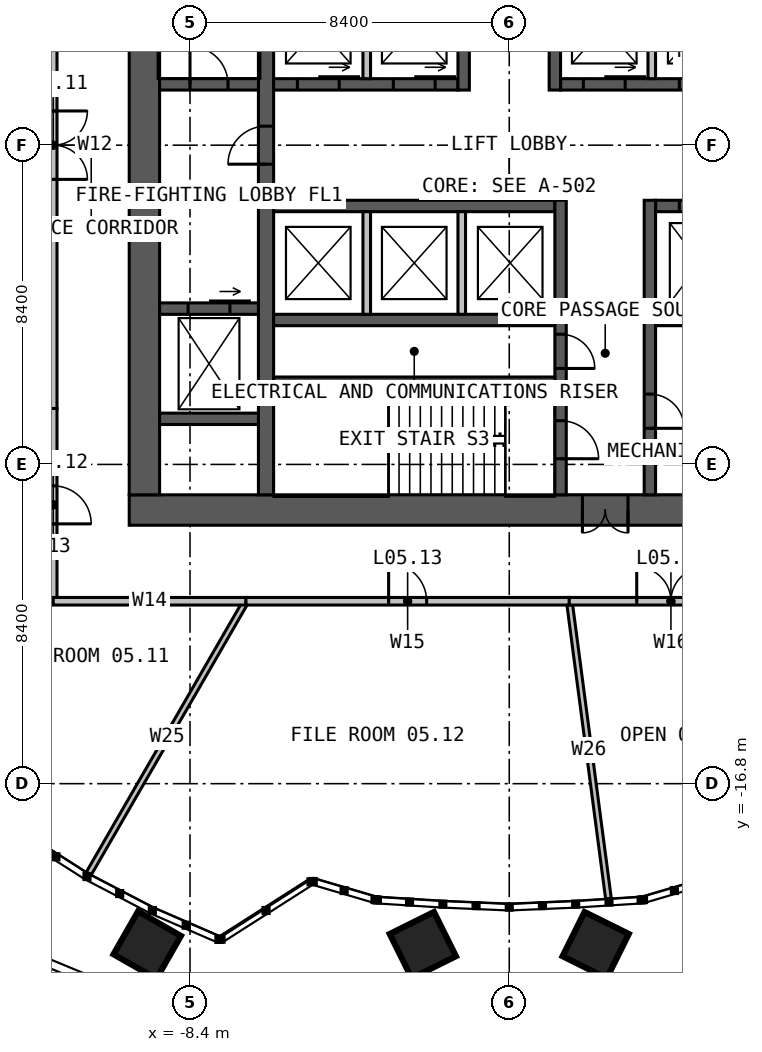
"""IFC4 building model, lengths in metres.
Left out: names, types, materials, properties, quantities, classifications, styles, units other than length and angle.
Written with IfcOpenShell. Run it as: python <this file> out.ifc"""

import sys

from ifc_helpers import new_model, si_unit, direction, frame, frame_2d, origin, place, context, subcontext, project, spatial, rectangle, extrude, element, fill, save


model = new_model("IFC4")
c1 = context("Model", 3, precision=1e-05, world=origin(), true_north=direction((0.0, 1.0)))
c2 = subcontext(c1, "Body", "Model", "MODEL_VIEW")
j1 = project(units=[si_unit("LENGTHUNIT", "METRE"), si_unit("PLANEANGLEUNIT", "RADIAN")], contexts=[c1])
p1 = place(None, origin())
s1 = spatial("IfcSite", under=j1, at=p1, CompositionType="ELEMENT")
p2 = place(p1, origin())
s2 = spatial("IfcBuilding", under=s1, at=p2, CompositionType="ELEMENT")
p3 = place(p2, frame((0.0, 0.0, 25.0)))
s3 = spatial("IfcBuildingStorey", under=s2, at=p3, CompositionType="ELEMENT", Elevation=25.0)
p4 = place(p3, frame((10.0, -9.6, 0.0), z_axis=(0.0, 0.0, 1.0), x_axis=(-1.0, 0.0, 0.0)))
e1 = element("IfcWall", 1, at=p4, inside=s3, PredefinedType="SOLIDWALL", context=c2, shape_type="SweptSolid", body=[
    extrude(rectangle(XDim=20.0, YDim=0.8, at=frame_2d((10.0, 0.0))), origin(), (0.0, 0.0, 1.0), 4.0),
])
p5 = place(p4, frame((6.875, 0.0, 0.0)))
e2 = element("IfcOpeningElement", 2, at=p5, cuts=e1, PredefinedType="OPENING", context=c2, shape_type="SweptSolid", body=[
    extrude(rectangle(XDim=1.2, YDim=2.2, at=frame_2d((0.6, 1.1))), frame((0.0, 0.41, 0.0), z_axis=(0.0, -1.0, 0.0), x_axis=(1.0, 0.0, 0.0)), (0.0, 0.0, 1.0), 0.82),
])
p6 = place(p3, frame((-9.6, 9.2, 0.0), z_axis=(0.0, 0.0, 1.0), x_axis=(0.0, -1.0, 0.0)))
e3 = element("IfcWall", 3, at=p6, inside=s3, PredefinedType="SOLIDWALL", context=c2, shape_type="SweptSolid", body=[
    extrude(rectangle(XDim=18.4, YDim=0.8, at=frame_2d((9.2, 0.0))), origin(), (0.0, 0.0, 1.0), 4.0),
])
p7 = place(p3, frame((-6.4, -9.2, 0.0), z_axis=(0.0, 0.0, 1.0), x_axis=(0.0, 1.0, 0.0)))
e4 = element("IfcWall", 4, at=p7, inside=s3, PredefinedType="SOLIDWALL", context=c2, shape_type="SweptSolid", body=[
    extrude(rectangle(XDim=18.4, YDim=0.4, at=frame_2d((9.2, 0.0))), origin(), (0.0, 0.0, 1.0), 4.0),
])
p8 = place(p7, frame((8.7, 0.0, 0.0)))
e5 = element("IfcOpeningElement", 5, at=p8, cuts=e4, PredefinedType="OPENING", context=c2, shape_type="SweptSolid", body=[
    extrude(rectangle(XDim=1.0, YDim=2.2, at=frame_2d((0.5, 1.1))), frame((0.0, 0.21, 0.0), z_axis=(0.0, -1.0, 0.0), x_axis=(1.0, 0.0, 0.0)), (0.0, 0.0, 1.0), 0.42),
])
p9 = place(p3, frame((-6.2, 1.6, 0.0), z_axis=(0.0, 0.0, 1.0), x_axis=(1.0, 0.0, 0.0)))
e6 = element("IfcWall", 6, at=p9, inside=s3, PredefinedType="SOLIDWALL", context=c2, shape_type="SweptSolid", body=[
    extrude(rectangle(XDim=4.85, YDim=0.3, at=frame_2d((2.425, 0.0))), origin(), (0.0, 0.0, 1.0), 4.0),
])
p10 = place(p9, frame((0.625, 0.0, 0.0)))
e7 = element("IfcOpeningElement", 7, at=p10, cuts=e6, PredefinedType="OPENING", context=c2, shape_type="SweptSolid", body=[
    extrude(rectangle(XDim=1.1, YDim=2.2, at=frame_2d((0.55, 1.1))), frame((0.0, 0.16, 0.0), z_axis=(0.0, -1.0, 0.0), x_axis=(1.0, 0.0, 0.0)), (0.0, 0.0, 1.0), 0.32),
])
p11 = place(p9, frame((3.15, 0.0, 0.0)))
e8 = element("IfcOpeningElement", 8, at=p11, cuts=e6, PredefinedType="OPENING", context=c2, shape_type="SweptSolid", body=[
    extrude(rectangle(XDim=1.1, YDim=2.2, at=frame_2d((0.55, 1.1))), frame((0.0, 0.16, 0.0), z_axis=(0.0, -1.0, 0.0), x_axis=(1.0, 0.0, 0.0)), (0.0, 0.0, 1.0), 0.32),
])
p12 = place(p3, frame((1.35, 1.6, 0.0), z_axis=(0.0, 0.0, 1.0), x_axis=(1.0, 0.0, 0.0)))
e9 = element("IfcWall", 9, at=p12, inside=s3, PredefinedType="SOLIDWALL", context=c2, shape_type="SweptSolid", body=[
    extrude(rectangle(XDim=4.85, YDim=0.3, at=frame_2d((2.425, 0.0))), origin(), (0.0, 0.0, 1.0), 4.0),
])
p13 = place(p12, frame((0.6, 0.0, 0.0)))
e10 = element("IfcOpeningElement", 10, at=p13, cuts=e9, PredefinedType="OPENING", context=c2, shape_type="SweptSolid", body=[
    extrude(rectangle(XDim=1.1, YDim=2.2, at=frame_2d((0.55, 1.1))), frame((0.0, 0.16, 0.0), z_axis=(0.0, -1.0, 0.0), x_axis=(1.0, 0.0, 0.0)), (0.0, 0.0, 1.0), 0.32),
])
p14 = place(p12, frame((3.125, 0.0, 0.0)))
e11 = element("IfcOpeningElement", 11, at=p14, cuts=e9, PredefinedType="OPENING", context=c2, shape_type="SweptSolid", body=[
    extrude(rectangle(XDim=1.1, YDim=2.2, at=frame_2d((0.55, 1.1))), frame((0.0, 0.16, 0.0), z_axis=(0.0, -1.0, 0.0), x_axis=(1.0, 0.0, 0.0)), (0.0, 0.0, 1.0), 0.32),
])
p15 = place(p3, frame((-1.2, 1.45, 0.0), z_axis=(0.0, 0.0, 1.0), x_axis=(0.0, 1.0, 0.0)))
e12 = element("IfcWall", 12, at=p15, inside=s3, PredefinedType="SOLIDWALL", context=c2, shape_type="SweptSolid", body=[
    extrude(rectangle(XDim=7.75, YDim=0.3, at=frame_2d((3.875, 0.0))), origin(), (0.0, 0.0, 1.0), 4.0),
])
p16 = place(p15, frame((5.05, 0.0, 0.0)))
e13 = element("IfcOpeningElement", 13, at=p16, cuts=e12, PredefinedType="OPENING", context=c2, shape_type="SweptSolid", body=[
    extrude(rectangle(XDim=1.0, YDim=2.2, at=frame_2d((0.5, 1.1))), frame((0.0, 0.16, 0.0), z_axis=(0.0, -1.0, 0.0), x_axis=(1.0, 0.0, 0.0)), (0.0, 0.0, 1.0), 0.32),
])
p17 = place(p3, frame((1.2, 1.45, 0.0), z_axis=(0.0, 0.0, 1.0), x_axis=(0.0, 1.0, 0.0)))
e14 = element("IfcWall", 14, at=p17, inside=s3, PredefinedType="SOLIDWALL", context=c2, shape_type="SweptSolid", body=[
    extrude(rectangle(XDim=7.75, YDim=0.3, at=frame_2d((3.875, 0.0))), origin(), (0.0, 0.0, 1.0), 4.0),
])
p18 = place(p17, frame((3.8, 0.0, 0.0)))
e15 = element("IfcOpeningElement", 15, at=p18, cuts=e14, PredefinedType="OPENING", context=c2, shape_type="SweptSolid", body=[
    extrude(rectangle(XDim=1.0, YDim=2.2, at=frame_2d((0.5, 1.1))), frame((0.0, 0.16, 0.0), z_axis=(0.0, -1.0, 0.0), x_axis=(1.0, 0.0, 0.0)), (0.0, 0.0, 1.0), 0.32),
])
p19 = place(p17, frame((6.15, 0.0, 0.0)))
e16 = element("IfcOpeningElement", 16, at=p19, cuts=e14, PredefinedType="OPENING", context=c2, shape_type="SweptSolid", body=[
    extrude(rectangle(XDim=1.0, YDim=2.2, at=frame_2d((0.5, 1.1))), frame((0.0, 0.16, 0.0), z_axis=(0.0, -1.0, 0.0), x_axis=(1.0, 0.0, 0.0)), (0.0, 0.0, 1.0), 0.32),
])
p20 = place(p3, frame((-6.2, -1.6, 0.0), z_axis=(0.0, 0.0, 1.0), x_axis=(1.0, 0.0, 0.0)))
e17 = element("IfcWall", 17, at=p20, inside=s3, PredefinedType="SOLIDWALL", context=c2, shape_type="SweptSolid", body=[
    extrude(rectangle(XDim=7.4, YDim=0.3, at=frame_2d((3.7, 0.0))), origin(), (0.0, 0.0, 1.0), 4.0),
])
p21 = place(p3, frame((3.85, -1.6, 0.0), z_axis=(0.0, 0.0, 1.0), x_axis=(1.0, 0.0, 0.0)))
e18 = element("IfcWall", 18, at=p21, inside=s3, PredefinedType="SOLIDWALL", context=c2, shape_type="SweptSolid", body=[
    extrude(rectangle(XDim=2.35, YDim=0.3, at=frame_2d((1.175, 0.0))), origin(), (0.0, 0.0, 1.0), 4.0),
])
p22 = place(p21, frame((0.625, 0.0, 0.0)))
e19 = element("IfcOpeningElement", 19, at=p22, cuts=e18, PredefinedType="OPENING", context=c2, shape_type="SweptSolid", body=[
    extrude(rectangle(XDim=1.1, YDim=2.2, at=frame_2d((0.55, 1.1))), frame((0.0, 0.16, 0.0), z_axis=(0.0, -1.0, 0.0), x_axis=(1.0, 0.0, 0.0)), (0.0, 0.0, 1.0), 0.32),
])
p23 = place(p3, frame((-6.2, -4.6, 0.0), z_axis=(0.0, 0.0, 1.0), x_axis=(1.0, 0.0, 0.0)))
e20 = element("IfcWall", 20, at=p23, inside=s3, PredefinedType="SOLIDWALL", context=c2, shape_type="SweptSolid", body=[
    extrude(rectangle(XDim=7.4, YDim=0.3, at=frame_2d((3.7, 0.0))), origin(), (0.0, 0.0, 1.0), 4.0),
])
p24 = place(p3, frame((3.85, -4.6, 0.0), z_axis=(0.0, 0.0, 1.0), x_axis=(1.0, 0.0, 0.0)))
e21 = element("IfcWall", 21, at=p24, inside=s3, PredefinedType="SOLIDWALL", context=c2, shape_type="SweptSolid", body=[
    extrude(rectangle(XDim=2.35, YDim=0.3, at=frame_2d((1.175, 0.0))), origin(), (0.0, 0.0, 1.0), 4.0),
])
p25 = place(p3, frame((1.35, -1.45, 0.0), z_axis=(0.0, 0.0, 1.0), x_axis=(0.0, -1.0, 0.0)))
e22 = element("IfcWall", 22, at=p25, inside=s3, PredefinedType="SOLIDWALL", context=c2, shape_type="SweptSolid", body=[
    extrude(rectangle(XDim=7.75, YDim=0.3, at=frame_2d((3.875, 0.0))), origin(), (0.0, 0.0, 1.0), 4.0),
])
p26 = place(p25, frame((5.8, 0.0, 0.0)))
e23 = element("IfcOpeningElement", 23, at=p26, cuts=e22, PredefinedType="OPENING", context=c2, shape_type="SweptSolid", body=[
    extrude(rectangle(XDim=1.0, YDim=2.2, at=frame_2d((0.5, 1.1))), frame((0.0, 0.16, 0.0), z_axis=(0.0, -1.0, 0.0), x_axis=(1.0, 0.0, 0.0)), (0.0, 0.0, 1.0), 0.32),
])
p27 = place(p25, frame((3.525, 0.0, 0.0)))
e24 = element("IfcOpeningElement", 24, at=p27, cuts=e22, PredefinedType="OPENING", context=c2, shape_type="SweptSolid", body=[
    extrude(rectangle(XDim=0.9, YDim=2.2, at=frame_2d((0.45, 1.1))), frame((0.0, 0.16, 0.0), z_axis=(0.0, -1.0, 0.0), x_axis=(1.0, 0.0, 0.0)), (0.0, 0.0, 1.0), 0.32),
])
p28 = place(p3, frame((3.7, -1.45, 0.0), z_axis=(0.0, 0.0, 1.0), x_axis=(0.0, -1.0, 0.0)))
e25 = element("IfcWall", 25, at=p28, inside=s3, PredefinedType="SOLIDWALL", context=c2, shape_type="SweptSolid", body=[
    extrude(rectangle(XDim=7.75, YDim=0.3, at=frame_2d((3.875, 0.0))), origin(), (0.0, 0.0, 1.0), 4.0),
])
p29 = place(p28, frame((5.1, 0.0, 0.0)))
e26 = element("IfcOpeningElement", 26, at=p29, cuts=e25, PredefinedType="OPENING", context=c2, shape_type="SweptSolid", body=[
    extrude(rectangle(XDim=0.9, YDim=2.2, at=frame_2d((0.45, 1.1))), frame((0.0, 0.16, 0.0), z_axis=(0.0, -1.0, 0.0), x_axis=(1.0, 0.0, 0.0)), (0.0, 0.0, 1.0), 0.32),
])
p30 = place(p3, frame((-6.2, -6.2, 0.0), z_axis=(0.0, 0.0, 1.0), x_axis=(1.0, 0.0, 0.0)))
e27 = element("IfcWall", 27, at=p30, inside=s3, PredefinedType="SOLIDWALL", context=c2, shape_type="SweptSolid", body=[
    extrude(rectangle(XDim=7.4, YDim=0.2, at=frame_2d((3.7, 0.0))), origin(), (0.0, 0.0, 1.0), 4.0),
])
p31 = place(p3, frame((-9.2, 1.6, 0.0), z_axis=(0.0, 0.0, 1.0), x_axis=(1.0, 0.0, 0.0)))
e28 = element("IfcWall", 28, at=p31, inside=s3, PredefinedType="SOLIDWALL", context=c2, shape_type="SweptSolid", body=[
    extrude(rectangle(XDim=2.6, YDim=0.3, at=frame_2d((1.3, 0.0))), origin(), (0.0, 0.0, 1.0), 4.0),
])
p32 = place(p31, frame((0.8, 0.0, 0.0)))
e29 = element("IfcOpeningElement", 29, at=p32, cuts=e28, PredefinedType="OPENING", context=c2, shape_type="SweptSolid", body=[
    extrude(rectangle(XDim=1.0, YDim=2.2, at=frame_2d((0.5, 1.1))), frame((0.0, 0.16, 0.0), z_axis=(0.0, -1.0, 0.0), x_axis=(1.0, 0.0, 0.0)), (0.0, 0.0, 1.0), 0.32),
])
p33 = place(p3, frame((-9.2, -4.3, 0.0), z_axis=(0.0, 0.0, 1.0), x_axis=(1.0, 0.0, 0.0)))
e30 = element("IfcWall", 30, at=p33, inside=s3, PredefinedType="SOLIDWALL", context=c2, shape_type="SweptSolid", body=[
    extrude(rectangle(XDim=2.6, YDim=0.3, at=frame_2d((1.3, 0.0))), origin(), (0.0, 0.0, 1.0), 4.0),
])
p34 = place(p33, frame((0.75, 0.0, 0.0)))
e31 = element("IfcOpeningElement", 31, at=p34, cuts=e30, PredefinedType="OPENING", context=c2, shape_type="SweptSolid", body=[
    extrude(rectangle(XDim=1.1, YDim=2.2, at=frame_2d((0.55, 1.1))), frame((0.0, 0.16, 0.0), z_axis=(0.0, -1.0, 0.0), x_axis=(1.0, 0.0, 0.0)), (0.0, 0.0, 1.0), 0.32),
])
p35 = place(p3, frame((-9.2, -7.2, 0.0), z_axis=(0.0, 0.0, 1.0), x_axis=(1.0, 0.0, 0.0)))
e32 = element("IfcWall", 32, at=p35, inside=s3, PredefinedType="SOLIDWALL", context=c2, shape_type="SweptSolid", body=[
    extrude(rectangle(XDim=2.6, YDim=0.3, at=frame_2d((1.3, 0.0))), origin(), (0.0, 0.0, 1.0), 4.0),
])
for number, where, z_axis, x_axis in (
    (33, (-3.75, 1.75, 0.0), (0.0, 0.0, 1.0), (0.0, 1.0, 0.0)),
    (34, (3.75, 1.75, 0.0), (0.0, 0.0, 1.0), (0.0, 1.0, 0.0)),
    (35, (-3.75, -1.75, 0.0), (0.0, 0.0, 1.0), (0.0, -1.0, 0.0)),
    (36, (-1.25, -1.75, 0.0), (0.0, 0.0, 1.0), (0.0, -1.0, 0.0)),
):
    element("IfcWall", number, at=place(p3, frame(where, z_axis=z_axis, x_axis=x_axis)), inside=s3, PredefinedType="SOLIDWALL", context=c2, shape_type="SweptSolid", body=[
        extrude(rectangle(XDim=2.7, YDim=0.2, at=frame_2d((1.35, 0.0))), origin(), (0.0, 0.0, 1.0), 3.75),
    ])
p36 = place(p3, frame((-12.0, -6.928, 0.0), z_axis=(0.0, 0.0, 1.0), x_axis=(-0.866024937074, -0.500000808366, 0.0)))
e37 = element("IfcWall", 37, at=p36, inside=s3, PredefinedType="PARTITIONING", context=c2, shape_type="SweptSolid", body=[
    extrude(rectangle(XDim=6.099, YDim=0.15, at=frame_2d((3.05, 0.0))), origin(), (0.0, 0.0, 1.0), 2.79),
])
p37 = place(p3, frame((-6.928, -12.0, 0.0), z_axis=(0.0, 0.0, 1.0), x_axis=(-0.499988970207, -0.866031771745, 0.0)))
e38 = element("IfcWall", 38, at=p37, inside=s3, PredefinedType="PARTITIONING", context=c2, shape_type="SweptSolid", body=[
    extrude(rectangle(XDim=8.273, YDim=0.15, at=frame_2d((4.137, 0.0))), origin(), (0.0, 0.0, 1.0), 2.79),
])
p38 = place(p3, frame((1.58, -12.0, 0.0), z_axis=(0.0, 0.0, 1.0), x_axis=(0.130512127361, -0.991446712946, 0.0)))
e39 = element("IfcWall", 39, at=p38, inside=s3, PredefinedType="PARTITIONING", context=c2, shape_type="SweptSolid", body=[
    extrude(rectangle(XDim=7.892, YDim=0.15, at=frame_2d((3.946, 0.0))), origin(), (0.0, 0.0, 1.0), 2.79),
])
p39 = place(p3, frame((-12.0, 6.928, 0.0), z_axis=(0.0, 0.0, 1.0), x_axis=(0.0, -1.0, 0.0)))
e40 = element("IfcWall", 40, at=p39, inside=s3, PredefinedType="PARTITIONING", context=c2, shape_type="SweptSolid", body=[
    extrude(rectangle(XDim=13.856, YDim=0.2, at=frame_2d((6.928, 0.0))), origin(), (0.0, 0.0, 1.0), 3.8),
])
p40 = place(p39, frame((6.028, 0.0, 0.0)))
e41 = element("IfcOpeningElement", 41, at=p40, cuts=e40, PredefinedType="OPENING", context=c2, shape_type="SweptSolid", body=[
    extrude(rectangle(XDim=1.8, YDim=2.2, at=frame_2d((0.9, 1.1))), frame((0.0, 0.11, 0.0), z_axis=(0.0, -1.0, 0.0), x_axis=(1.0, 0.0, 0.0)), (0.0, 0.0, 1.0), 0.22),
])
p41 = place(p3, frame((-12.0, -6.928, 0.0), z_axis=(0.0, 0.0, 1.0), x_axis=(0.0, -1.0, 0.0)))
e42 = element("IfcWall", 42, at=p41, inside=s3, PredefinedType="PARTITIONING", context=c2, shape_type="SweptSolid", body=[
    extrude(rectangle(XDim=5.072, YDim=0.2, at=frame_2d((2.536, 0.0))), origin(), (0.0, 0.0, 1.0), 3.8),
])
p42 = place(p41, frame((2.036, 0.0, 0.0)))
e43 = element("IfcOpeningElement", 43, at=p42, cuts=e42, PredefinedType="OPENING", context=c2, shape_type="SweptSolid", body=[
    extrude(rectangle(XDim=1.0, YDim=2.2, at=frame_2d((0.5, 1.1))), frame((0.0, 0.11, 0.0), z_axis=(0.0, -1.0, 0.0), x_axis=(1.0, 0.0, 0.0)), (0.0, 0.0, 1.0), 0.22),
])
p43 = place(p3, frame((-12.0, -12.0, 0.0), z_axis=(0.0, 0.0, 1.0), x_axis=(1.0, 0.0, 0.0)))
e44 = element("IfcWall", 44, at=p43, inside=s3, PredefinedType="PARTITIONING", context=c2, shape_type="SweptSolid", body=[
    extrude(rectangle(XDim=5.072, YDim=0.2, at=frame_2d((2.536, 0.0))), origin(), (0.0, 0.0, 1.0), 3.8),
])
p44 = place(p3, frame((-6.928, -12.0, 0.0), z_axis=(0.0, 0.0, 1.0), x_axis=(1.0, 0.0, 0.0)))
e45 = element("IfcWall", 45, at=p44, inside=s3, PredefinedType="PARTITIONING", context=c2, shape_type="SweptSolid", body=[
    extrude(rectangle(XDim=8.508, YDim=0.2, at=frame_2d((4.254, 0.0))), origin(), (0.0, 0.0, 1.0), 3.8),
])
p45 = place(p44, frame((3.754, 0.0, 0.0)))
e46 = element("IfcOpeningElement", 46, at=p45, cuts=e45, PredefinedType="OPENING", context=c2, shape_type="SweptSolid", body=[
    extrude(rectangle(XDim=1.0, YDim=2.2, at=frame_2d((0.5, 1.1))), frame((0.0, 0.11, 0.0), z_axis=(0.0, -1.0, 0.0), x_axis=(1.0, 0.0, 0.0)), (0.0, 0.0, 1.0), 0.22),
])
p46 = place(p3, frame((1.58, -12.0, 0.0), z_axis=(0.0, 0.0, 1.0), x_axis=(1.0, 0.0, 0.0)))
e47 = element("IfcWall", 47, at=p46, inside=s3, PredefinedType="PARTITIONING", context=c2, shape_type="SweptSolid", body=[
    extrude(rectangle(XDim=5.348, YDim=0.2, at=frame_2d((2.674, 0.0))), origin(), (0.0, 0.0, 1.0), 3.8),
])
p47 = place(p46, frame((1.774, 0.0, 0.0)))
e48 = element("IfcOpeningElement", 48, at=p47, cuts=e47, PredefinedType="OPENING", context=c2, shape_type="SweptSolid", body=[
    extrude(rectangle(XDim=1.8, YDim=2.2, at=frame_2d((0.9, 1.1))), frame((0.0, 0.11, 0.0), z_axis=(0.0, -1.0, 0.0), x_axis=(1.0, 0.0, 0.0)), (0.0, 0.0, 1.0), 0.22),
])
p48 = place(p5, origin())
e49 = element("IfcDoor", 49, at=p48, inside=s3, OperationType="DOUBLE_DOOR_SINGLE_SWING", PredefinedType="DOOR", context=c2, shape_type="SweptSolid", body=[
    extrude(rectangle(XDim=1.2, YDim=2.2, at=frame_2d((0.6, 1.1))), frame((0.0, 0.025, 0.0), z_axis=(0.0, -1.0, 0.0), x_axis=(1.0, 0.0, 0.0)), (0.0, 0.0, 1.0), 0.05),
])
fill(e2, e49)
p49 = place(p8, origin())
e50 = element("IfcDoor", 50, at=p49, inside=s3, OperationType="SINGLE_SWING_LEFT", PredefinedType="DOOR", context=c2, shape_type="SweptSolid", body=[
    extrude(rectangle(XDim=1.0, YDim=2.2, at=frame_2d((0.5, 1.1))), frame((0.0, 0.025, 0.0), z_axis=(0.0, -1.0, 0.0), x_axis=(1.0, 0.0, 0.0)), (0.0, 0.0, 1.0), 0.05),
])
fill(e5, e50)
p50 = place(p32, origin())
e51 = element("IfcDoor", 51, at=p50, inside=s3, OperationType="SINGLE_SWING_LEFT", PredefinedType="DOOR", context=c2, shape_type="SweptSolid", body=[
    extrude(rectangle(XDim=1.0, YDim=2.2, at=frame_2d((0.5, 1.1))), frame((0.0, 0.025, 0.0), z_axis=(0.0, -1.0, 0.0), x_axis=(1.0, 0.0, 0.0)), (0.0, 0.0, 1.0), 0.05),
])
fill(e29, e51)
p51 = place(p26, origin())
e52 = element("IfcDoor", 52, at=p51, inside=s3, OperationType="SINGLE_SWING_RIGHT", PredefinedType="DOOR", context=c2, shape_type="SweptSolid", body=[
    extrude(rectangle(XDim=1.0, YDim=2.2, at=frame_2d((0.5, 1.1))), frame((0.0, 0.025, 0.0), z_axis=(0.0, -1.0, 0.0), x_axis=(1.0, 0.0, 0.0)), (0.0, 0.0, 1.0), 0.05),
])
fill(e23, e52)
p52 = place(p27, origin())
e53 = element("IfcDoor", 53, at=p52, inside=s3, OperationType="SINGLE_SWING_RIGHT", PredefinedType="DOOR", context=c2, shape_type="SweptSolid", body=[
    extrude(rectangle(XDim=0.9, YDim=2.2, at=frame_2d((0.45, 1.1))), frame((0.0, 0.025, 0.0), z_axis=(0.0, -1.0, 0.0), x_axis=(1.0, 0.0, 0.0)), (0.0, 0.0, 1.0), 0.05),
])
fill(e24, e53)
p53 = place(p29, origin())
e54 = element("IfcDoor", 54, at=p53, inside=s3, OperationType="SINGLE_SWING_RIGHT", PredefinedType="DOOR", context=c2, shape_type="SweptSolid", body=[
    extrude(rectangle(XDim=0.9, YDim=2.2, at=frame_2d((0.45, 1.1))), frame((0.0, 0.025, 0.0), z_axis=(0.0, -1.0, 0.0), x_axis=(1.0, 0.0, 0.0)), (0.0, 0.0, 1.0), 0.05),
])
fill(e26, e54)
p54 = place(p10, origin())
e55 = element("IfcDoor", 55, at=p54, inside=s3, OperationType="SLIDING_TO_LEFT", PredefinedType="DOOR", context=c2, shape_type="SweptSolid", body=[
    extrude(rectangle(XDim=1.1, YDim=2.2, at=frame_2d((0.55, 1.1))), frame((0.0, 0.025, 0.0), z_axis=(0.0, -1.0, 0.0), x_axis=(1.0, 0.0, 0.0)), (0.0, 0.0, 1.0), 0.05),
])
fill(e7, e55)
p55 = place(p11, origin())
e56 = element("IfcDoor", 56, at=p55, inside=s3, OperationType="SLIDING_TO_LEFT", PredefinedType="DOOR", context=c2, shape_type="SweptSolid", body=[
    extrude(rectangle(XDim=1.1, YDim=2.2, at=frame_2d((0.55, 1.1))), frame((0.0, 0.025, 0.0), z_axis=(0.0, -1.0, 0.0), x_axis=(1.0, 0.0, 0.0)), (0.0, 0.0, 1.0), 0.05),
])
fill(e8, e56)
p56 = place(p13, origin())
e57 = element("IfcDoor", 57, at=p56, inside=s3, OperationType="SLIDING_TO_LEFT", PredefinedType="DOOR", context=c2, shape_type="SweptSolid", body=[
    extrude(rectangle(XDim=1.1, YDim=2.2, at=frame_2d((0.55, 1.1))), frame((0.0, 0.025, 0.0), z_axis=(0.0, -1.0, 0.0), x_axis=(1.0, 0.0, 0.0)), (0.0, 0.0, 1.0), 0.05),
])
fill(e10, e57)
p57 = place(p14, origin())
e58 = element("IfcDoor", 58, at=p57, inside=s3, OperationType="SLIDING_TO_LEFT", PredefinedType="DOOR", context=c2, shape_type="SweptSolid", body=[
    extrude(rectangle(XDim=1.1, YDim=2.2, at=frame_2d((0.55, 1.1))), frame((0.0, 0.025, 0.0), z_axis=(0.0, -1.0, 0.0), x_axis=(1.0, 0.0, 0.0)), (0.0, 0.0, 1.0), 0.05),
])
fill(e11, e58)
p58 = place(p22, origin())
e59 = element("IfcDoor", 59, at=p58, inside=s3, OperationType="SLIDING_TO_LEFT", PredefinedType="DOOR", context=c2, shape_type="SweptSolid", body=[
    extrude(rectangle(XDim=1.1, YDim=2.2, at=frame_2d((0.55, 1.1))), frame((0.0, 0.025, 0.0), z_axis=(0.0, -1.0, 0.0), x_axis=(1.0, 0.0, 0.0)), (0.0, 0.0, 1.0), 0.05),
])
fill(e19, e59)
p59 = place(p34, origin())
e60 = element("IfcDoor", 60, at=p59, inside=s3, OperationType="SLIDING_TO_LEFT", PredefinedType="DOOR", context=c2, shape_type="SweptSolid", body=[
    extrude(rectangle(XDim=1.1, YDim=2.2, at=frame_2d((0.55, 1.1))), frame((0.0, 0.025, 0.0), z_axis=(0.0, -1.0, 0.0), x_axis=(1.0, 0.0, 0.0)), (0.0, 0.0, 1.0), 0.05),
])
fill(e31, e60)
p60 = place(p40, origin())
e61 = element("IfcDoor", 61, at=p60, inside=s3, OperationType="DOUBLE_DOOR_SINGLE_SWING", PredefinedType="DOOR", context=c2, shape_type="SweptSolid", body=[
    extrude(rectangle(XDim=1.8, YDim=2.2, at=frame_2d((0.9, 1.1))), frame((0.0, 0.025, 0.0), z_axis=(0.0, -1.0, 0.0), x_axis=(1.0, 0.0, 0.0)), (0.0, 0.0, 1.0), 0.05),
])
fill(e41, e61)
p61 = place(p42, origin())
e62 = element("IfcDoor", 62, at=p61, inside=s3, OperationType="SINGLE_SWING_RIGHT", PredefinedType="DOOR", context=c2, shape_type="SweptSolid", body=[
    extrude(rectangle(XDim=1.0, YDim=2.2, at=frame_2d((0.5, 1.1))), frame((0.0, 0.025, 0.0), z_axis=(0.0, -1.0, 0.0), x_axis=(1.0, 0.0, 0.0)), (0.0, 0.0, 1.0), 0.05),
])
fill(e43, e62)
p62 = place(p45, origin())
e63 = element("IfcDoor", 63, at=p62, inside=s3, OperationType="SINGLE_SWING_LEFT", PredefinedType="DOOR", context=c2, shape_type="SweptSolid", body=[
    extrude(rectangle(XDim=1.0, YDim=2.2, at=frame_2d((0.5, 1.1))), frame((0.0, 0.025, 0.0), z_axis=(0.0, -1.0, 0.0), x_axis=(1.0, 0.0, 0.0)), (0.0, 0.0, 1.0), 0.05),
])
fill(e46, e63)
p63 = place(p47, origin())
e64 = element("IfcDoor", 64, at=p63, inside=s3, OperationType="DOUBLE_DOOR_SINGLE_SWING", PredefinedType="DOOR", context=c2, shape_type="SweptSolid", body=[
    extrude(rectangle(XDim=1.8, YDim=2.2, at=frame_2d((0.9, 1.1))), frame((0.0, 0.025, 0.0), z_axis=(0.0, -1.0, 0.0), x_axis=(1.0, 0.0, 0.0)), (0.0, 0.0, 1.0), 0.05),
])
fill(e48, e64)
save(model, sys.argv[1])
